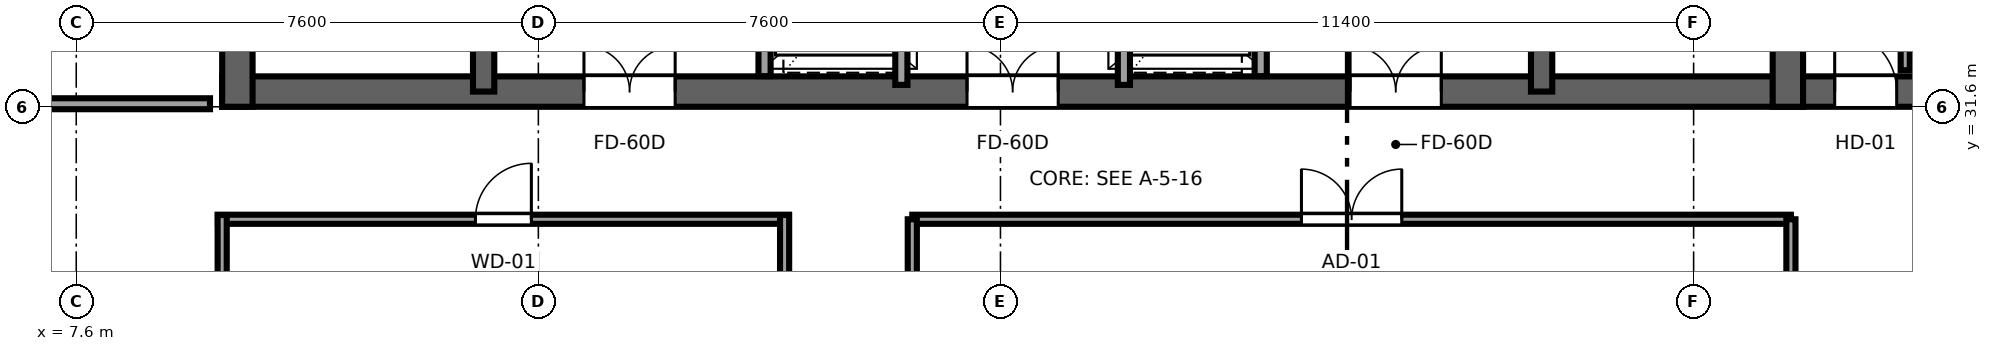
"""IFC4 building model, lengths in metres.
Left out: names, types, materials, properties, quantities, classifications, styles, units other than length and angle.
Written with IfcOpenShell. Run it as: python <this file> out.ifc"""

import sys

from ifc_helpers import new_model, si_unit, direction, frame, frame_2d, origin, place, context, subcontext, project, spatial, rectangle, extrude, source, transform, mapped, element, fill, save


model = new_model("IFC4")
c1 = context("Model", 3, precision=1e-05, world=origin(), true_north=direction((0.0, 1.0)))
c2 = subcontext(c1, "Body", "Model", "MODEL_VIEW")
j1 = project(units=[si_unit("LENGTHUNIT", "METRE"), si_unit("PLANEANGLEUNIT", "RADIAN")], contexts=[c1])
p1 = place(None, origin())
s1 = spatial("IfcSite", under=j1, at=p1, CompositionType="ELEMENT")
p2 = place(p1, origin())
s2 = spatial("IfcBuilding", under=s1, at=p2, CompositionType="ELEMENT")
p3 = place(p2, frame((0.0, 0.0, 227.45)))
s3 = spatial("IfcBuildingStorey", under=s2, at=p3, CompositionType="ELEMENT", Elevation=227.45)
p4 = place(p3, frame((10.0, 31.85, 0.0), z_axis=(0.0, 0.0, 1.0), x_axis=(1.0, 0.0, 0.0)))
e1 = element("IfcWall", 1, at=p4, inside=s3, PredefinedType="SHEAR", context=c2, shape_type="SweptSolid", body=[
    extrude(rectangle(XDim=26.0, YDim=0.5, at=frame_2d((13.0, 0.0))), origin(), (0.0, 0.0, 1.0), 3.55),
])
p5 = place(p4, frame((7.45, 0.0, 0.0), z_axis=(0.0, 0.0, 1.0), x_axis=(-1.0, 0.0, 0.0)))
e2 = element("IfcOpeningElement", 2, at=p5, cuts=e1, PredefinedType="OPENING", context=c2, shape_type="SweptSolid", body=[
    extrude(rectangle(XDim=1.5, YDim=2.04, at=frame_2d((0.75, 1.02))), frame((0.0, 0.26, 0.0), z_axis=(0.0, -1.0, 0.0), x_axis=(1.0, 0.0, 0.0)), (0.0, 0.0, 1.0), 0.52),
])
p6 = place(p4, frame((13.75, 0.0, 0.0), z_axis=(0.0, 0.0, 1.0), x_axis=(-1.0, 0.0, 0.0)))
e3 = element("IfcOpeningElement", 3, at=p6, cuts=e1, PredefinedType="OPENING", context=c2, shape_type="SweptSolid", body=[
    extrude(rectangle(XDim=1.5, YDim=2.04, at=frame_2d((0.75, 1.02))), frame((0.0, 0.26, 0.0), z_axis=(0.0, -1.0, 0.0), x_axis=(1.0, 0.0, 0.0)), (0.0, 0.0, 1.0), 0.52),
])
p7 = place(p4, frame((20.05, 0.0, 0.0), z_axis=(0.0, 0.0, 1.0), x_axis=(-1.0, 0.0, 0.0)))
e4 = element("IfcOpeningElement", 4, at=p7, cuts=e1, PredefinedType="OPENING", context=c2, shape_type="SweptSolid", body=[
    extrude(rectangle(XDim=1.5, YDim=2.04, at=frame_2d((0.75, 1.02))), frame((0.0, 0.26, 0.0), z_axis=(0.0, -1.0, 0.0), x_axis=(1.0, 0.0, 0.0)), (0.0, 0.0, 1.0), 0.52),
])
for number, where, z_axis, x_axis in (
    (5, (10.25, 31.6, 0.0), (0.0, 0.0, 1.0), (0.0, 1.0, 0.0)),
    (6, (35.75, 31.6, 0.0), (0.0, 0.0, 1.0), (0.0, 1.0, 0.0)),
):
    element("IfcWall", number, at=place(p3, frame(where, z_axis=z_axis, x_axis=x_axis)), inside=s3, PredefinedType="SHEAR", context=c2, shape_type="SweptSolid", body=[
        extrude(rectangle(XDim=13.6, YDim=0.5, at=frame_2d((6.8, 0.0))), origin(), (0.0, 0.0, 1.0), 3.55),
    ])
p8 = place(p3, frame((14.3, 31.85, 0.0), z_axis=(0.0, 0.0, 1.0), x_axis=(0.0, 1.0, 0.0)))
e7 = element("IfcWall", 7, at=p8, inside=s3, PredefinedType="SHEAR", context=c2, shape_type="SweptSolid", body=[
    extrude(rectangle(XDim=13.1, YDim=0.35, at=frame_2d((6.55, 0.0))), origin(), (0.0, 0.0, 1.0), 3.55),
])
p9 = place(p8, frame((0.7, 0.0, 0.0)))
e8 = element("IfcOpeningElement", 8, at=p9, cuts=e7, PredefinedType="OPENING", context=c2, shape_type="SweptSolid", body=[
    extrude(rectangle(XDim=1.1, YDim=2.12, at=frame_2d((0.55, 1.06))), frame((0.0, 0.185, 0.0), z_axis=(0.0, -1.0, 0.0), x_axis=(1.0, 0.0, 0.0)), (0.0, 0.0, 1.0), 0.37),
])
p10 = place(p3, frame((31.7, 31.85, 0.0), z_axis=(0.0, 0.0, 1.0), x_axis=(0.0, 1.0, 0.0)))
e9 = element("IfcWall", 9, at=p10, inside=s3, PredefinedType="SHEAR", context=c2, shape_type="SweptSolid", body=[
    extrude(rectangle(XDim=13.1, YDim=0.35, at=frame_2d((6.55, 0.0))), origin(), (0.0, 0.0, 1.0), 3.55),
])
p11 = place(p10, frame((1.8, 0.0, 0.0), z_axis=(0.0, 0.0, 1.0), x_axis=(-1.0, 0.0, 0.0)))
e10 = element("IfcOpeningElement", 10, at=p11, cuts=e9, PredefinedType="OPENING", context=c2, shape_type="SweptSolid", body=[
    extrude(rectangle(XDim=1.1, YDim=2.12, at=frame_2d((0.55, 1.06))), frame((0.0, 0.185, 0.0), z_axis=(0.0, -1.0, 0.0), x_axis=(1.0, 0.0, 0.0)), (0.0, 0.0, 1.0), 0.37),
])
p12 = place(p3, frame((36.0, 31.85, 0.0), z_axis=(0.0, 0.0, 1.0), x_axis=(1.0, 0.0, 0.0)))
e11 = element("IfcWall", 11, at=p12, inside=s3, PredefinedType="SHEAR", context=c2, shape_type="SweptSolid", body=[
    extrude(rectangle(XDim=3.8, YDim=0.5, at=frame_2d((1.9, 0.0))), origin(), (0.0, 0.0, 1.0), 3.55),
])
p13 = place(p12, frame((1.54, 0.0, 0.0), z_axis=(0.0, 0.0, 1.0), x_axis=(-1.0, 0.0, 0.0)))
e12 = element("IfcOpeningElement", 12, at=p13, cuts=e11, PredefinedType="OPENING", context=c2, shape_type="SweptSolid", body=[
    extrude(rectangle(XDim=1.02, YDim=2.03, at=frame_2d((0.51, 1.015))), frame((0.0, 0.26, 0.0), z_axis=(0.0, -1.0, 0.0), x_axis=(1.0, 0.0, 0.0)), (0.0, 0.0, 1.0), 0.52),
])
for number, where, z_axis, x_axis in (
    (13, (18.92, 32.104, 0.0), (0.0, 0.0, 1.0), (0.0, 1.0, 0.0)),
    (14, (27.08, 32.104, 0.0), (0.0, 0.0, 1.0), (0.0, 1.0, 0.0)),
):
    element("IfcWall", number, at=place(p3, frame(where, z_axis=z_axis, x_axis=x_axis)), inside=s3, PredefinedType="SOLIDWALL", context=c2, shape_type="SweptSolid", body=[
        extrude(rectangle(XDim=4.046, YDim=0.2, at=frame_2d((2.023, 0.0))), origin(), (0.0, 0.0, 1.0), 3.37),
    ])
p14 = place(p3, frame((21.17, 31.96, 0.0), z_axis=(0.0, 0.0, 1.0), x_axis=(0.0, 1.0, 0.0)))
e15 = element("IfcWall", 15, at=p14, inside=s3, PredefinedType="SOLIDWALL", context=c2, shape_type="SweptSolid", body=[
    extrude(rectangle(XDim=5.08, YDim=0.2, at=frame_2d((2.54, 0.0))), origin(), (0.0, 0.0, 1.0), 3.37),
])
p15 = place(p14, frame((0.74, 0.0, 0.0)))
e16 = element("IfcOpeningElement", 16, at=p15, cuts=e15, PredefinedType="OPENING", context=c2, shape_type="SweptSolid", body=[
    extrude(rectangle(XDim=1.1, YDim=2.12, at=frame_2d((0.55, 1.06))), frame((0.0, 0.11, 0.0), z_axis=(0.0, -1.0, 0.0), x_axis=(1.0, 0.0, 0.0)), (0.0, 0.0, 1.0), 0.22),
])
p16 = place(p14, frame((3.24, 0.0, 0.0)))
e17 = element("IfcOpeningElement", 17, at=p16, cuts=e15, PredefinedType="OPENING", context=c2, shape_type="SweptSolid", body=[
    extrude(rectangle(XDim=1.1, YDim=2.12, at=frame_2d((0.55, 1.06))), frame((0.0, 0.11, 0.0), z_axis=(0.0, -1.0, 0.0), x_axis=(1.0, 0.0, 0.0)), (0.0, 0.0, 1.0), 0.22),
])
p17 = place(p3, frame((24.83, 31.96, 0.0), z_axis=(0.0, 0.0, 1.0), x_axis=(0.0, 1.0, 0.0)))
e18 = element("IfcWall", 18, at=p17, inside=s3, PredefinedType="SOLIDWALL", context=c2, shape_type="SweptSolid", body=[
    extrude(rectangle(XDim=5.08, YDim=0.2, at=frame_2d((2.54, 0.0))), origin(), (0.0, 0.0, 1.0), 3.37),
])
p18 = place(p17, frame((0.74, 0.0, 0.0)))
e19 = element("IfcOpeningElement", 19, at=p18, cuts=e18, PredefinedType="OPENING", context=c2, shape_type="SweptSolid", body=[
    extrude(rectangle(XDim=1.1, YDim=2.12, at=frame_2d((0.55, 1.06))), frame((0.0, 0.11, 0.0), z_axis=(0.0, -1.0, 0.0), x_axis=(1.0, 0.0, 0.0)), (0.0, 0.0, 1.0), 0.22),
])
p19 = place(p17, frame((3.24, 0.0, 0.0)))
e20 = element("IfcOpeningElement", 20, at=p19, cuts=e18, PredefinedType="OPENING", context=c2, shape_type="SweptSolid", body=[
    extrude(rectangle(XDim=1.1, YDim=2.12, at=frame_2d((0.55, 1.06))), frame((0.0, 0.11, 0.0), z_axis=(0.0, -1.0, 0.0), x_axis=(1.0, 0.0, 0.0)), (0.0, 0.0, 1.0), 0.22),
])
p20 = place(p3, frame((37.68, 32.2, 0.0), z_axis=(0.0, 0.0, 1.0), x_axis=(0.0, 1.0, 0.0)))
e21 = element("IfcWall", 21, at=p20, inside=s3, PredefinedType="PARTITIONING", context=c2, shape_type="SweptSolid", body=[
    extrude(rectangle(XDim=6.0, YDim=0.15, at=frame_2d((3.0, 0.0))), origin(), (0.0, 0.0, 1.0), 3.37),
])
p21 = place(p20, frame((2.49, 0.0, 0.0)))
e22 = element("IfcOpeningElement", 22, at=p21, cuts=e21, PredefinedType="OPENING", context=c2, shape_type="SweptSolid", body=[
    extrude(rectangle(XDim=1.02, YDim=2.03, at=frame_2d((0.51, 1.015))), frame((0.0, 0.085, 0.0), z_axis=(0.0, -1.0, 0.0), x_axis=(1.0, 0.0, 0.0)), (0.0, 0.0, 1.0), 0.17),
])
p22 = place(p3, frame((2.9, 31.65, 0.0), z_axis=(0.0, 0.0, 1.0), x_axis=(1.0, 0.0, 0.0)))
e23 = element("IfcWall", 23, at=p22, inside=s3, PredefinedType="PARTITIONING", context=c2, shape_type="SweptSolid", body=[
    extrude(rectangle(XDim=6.9, YDim=0.18, at=frame_2d((3.45, 0.0))), origin(), (0.0, 0.0, 1.0), 3.37),
])
p23 = place(p22, frame((2.625, 0.0, 0.0)))
e24 = element("IfcOpeningElement", 24, at=p23, cuts=e23, PredefinedType="OPENING", context=c2, shape_type="SweptSolid", body=[
    extrude(rectangle(XDim=1.65, YDim=2.15, at=frame_2d((0.825, 1.075))), frame((0.0, 0.1, 0.0), z_axis=(0.0, -1.0, 0.0), x_axis=(1.0, 0.0, 0.0)), (0.0, 0.0, 1.0), 0.2),
])
p24 = place(p3, frame((9.93, 29.75, 0.0), z_axis=(0.0, 0.0, 1.0), x_axis=(1.0, 0.0, 0.0)))
e25 = element("IfcWall", 25, at=p24, inside=s3, PredefinedType="PARTITIONING", context=c2, shape_type="SweptSolid", body=[
    extrude(rectangle(XDim=9.39, YDim=0.15, at=frame_2d((4.695, 0.0))), origin(), (0.0, 0.0, 1.0), 3.37),
])
p25 = place(p24, frame((4.235, 0.0, 0.0)))
e26 = element("IfcOpeningElement", 26, at=p25, cuts=e25, PredefinedType="OPENING", context=c2, shape_type="SweptSolid", body=[
    extrude(rectangle(XDim=0.92, YDim=2.01, at=frame_2d((0.46, 1.005))), frame((0.0, 0.085, 0.0), z_axis=(0.0, -1.0, 0.0), x_axis=(1.0, 0.0, 0.0)), (0.0, 0.0, 1.0), 0.17),
])
for number, where, z_axis, x_axis in (
    (27, (10.0, 27.03, 0.0), (0.0, 0.0, 1.0), (0.0, 1.0, 0.0)),
    (28, (19.25, 27.03, 0.0), (0.0, 0.0, 1.0), (0.0, 1.0, 0.0)),
):
    element("IfcWall", number, at=place(p3, frame(where, z_axis=z_axis, x_axis=x_axis)), inside=s3, PredefinedType="PARTITIONING", context=c2, shape_type="SweptSolid", body=[
        extrude(rectangle(XDim=2.79, YDim=0.15, at=frame_2d((1.395, 0.0))), origin(), (0.0, 0.0, 1.0), 3.37),
    ])
p26 = place(p3, frame((21.35, 29.75, 0.0), z_axis=(0.0, 0.0, 1.0), x_axis=(1.0, 0.0, 0.0)))
e29 = element("IfcWall", 29, at=p26, inside=s3, PredefinedType="PARTITIONING", context=c2, shape_type="SweptSolid", body=[
    extrude(rectangle(XDim=14.45, YDim=0.15, at=frame_2d((7.225, 0.0))), origin(), (0.0, 0.0, 1.0), 3.37),
])
p27 = place(p26, frame((6.4, 0.0, 0.0)))
e30 = element("IfcOpeningElement", 30, at=p27, cuts=e29, PredefinedType="OPENING", context=c2, shape_type="SweptSolid", body=[
    extrude(rectangle(XDim=1.65, YDim=2.15, at=frame_2d((0.825, 1.075))), frame((0.0, 0.085, 0.0), z_axis=(0.0, -1.0, 0.0), x_axis=(1.0, 0.0, 0.0)), (0.0, 0.0, 1.0), 0.17),
])
for number, where, z_axis, x_axis in (
    (31, (21.35, 25.0, 0.0), (0.0, 0.0, 1.0), (0.0, 1.0, 0.0)),
    (32, (35.8, 25.0, 0.0), (0.0, 0.0, 1.0), (0.0, 1.0, 0.0)),
):
    element("IfcWall", number, at=place(p3, frame(where, z_axis=z_axis, x_axis=x_axis)), inside=s3, PredefinedType="PARTITIONING", context=c2, shape_type="SweptSolid", body=[
        extrude(rectangle(XDim=4.75, YDim=0.15, at=frame_2d((2.375, 0.0))), origin(), (0.0, 0.0, 1.0), 3.37),
    ])
m1 = source(origin(), c2, "Body", "SweptSolid", [
    extrude(rectangle(XDim=1.5, YDim=2.04, at=frame_2d((0.75, 1.02))), frame((0.0, 0.025, 0.0), z_axis=(0.0, -1.0, 0.0), x_axis=(1.0, 0.0, 0.0)), (0.0, 0.0, 1.0), 0.05),
])
p28 = place(p5, origin())
e33 = element("IfcDoor", 33, at=p28, inside=s3, OperationType="DOUBLE_DOOR_SINGLE_SWING", PredefinedType="DOOR", context=c2, shape_type="MappedRepresentation", body=[
    mapped(m1, transform((0.0, 0.0, 0.0), x_axis=(1.0, 0.0, 0.0), y_axis=(0.0, 1.0, 0.0), z_axis=(0.0, 0.0, 1.0), scale=1.0)),
])
fill(e2, e33)
p29 = place(p6, origin())
e34 = element("IfcDoor", 34, at=p29, inside=s3, OperationType="DOUBLE_DOOR_SINGLE_SWING", PredefinedType="DOOR", context=c2, shape_type="MappedRepresentation", body=[
    mapped(m1, transform((0.0, 0.0, 0.0), x_axis=(1.0, 0.0, 0.0), y_axis=(0.0, 1.0, 0.0), z_axis=(0.0, 0.0, 1.0), scale=1.0)),
])
fill(e3, e34)
p30 = place(p7, origin())
e35 = element("IfcDoor", 35, at=p30, inside=s3, OperationType="DOUBLE_DOOR_SINGLE_SWING", PredefinedType="DOOR", context=c2, shape_type="MappedRepresentation", body=[
    mapped(m1, transform((0.0, 0.0, 0.0), x_axis=(1.0, 0.0, 0.0), y_axis=(0.0, 1.0, 0.0), z_axis=(0.0, 0.0, 1.0), scale=1.0)),
])
fill(e4, e35)
m2 = source(origin(), c2, "Body", "SweptSolid", [
    extrude(rectangle(XDim=1.02, YDim=2.03, at=frame_2d((0.51, 1.015))), frame((0.0, 0.025, 0.0), z_axis=(0.0, -1.0, 0.0), x_axis=(1.0, 0.0, 0.0)), (0.0, 0.0, 1.0), 0.05),
])
p31 = place(p13, origin())
e36 = element("IfcDoor", 36, at=p31, inside=s3, OperationType="SINGLE_SWING_LEFT", PredefinedType="DOOR", context=c2, shape_type="MappedRepresentation", body=[
    mapped(m2, transform((0.0, 0.0, 0.0), x_axis=(1.0, 0.0, 0.0), y_axis=(0.0, 1.0, 0.0), z_axis=(0.0, 0.0, 1.0), scale=1.0)),
])
fill(e12, e36)
m3 = source(origin(), c2, "Body", "SweptSolid", [
    extrude(rectangle(XDim=0.92, YDim=2.01, at=frame_2d((0.46, 1.005))), frame((0.0, 0.025, 0.0), z_axis=(0.0, -1.0, 0.0), x_axis=(1.0, 0.0, 0.0)), (0.0, 0.0, 1.0), 0.05),
])
p32 = place(p25, origin())
e37 = element("IfcDoor", 37, at=p32, inside=s3, OperationType="SINGLE_SWING_RIGHT", PredefinedType="DOOR", context=c2, shape_type="MappedRepresentation", body=[
    mapped(m3, transform((0.0, 0.0, 0.0), x_axis=(1.0, 0.0, 0.0), y_axis=(0.0, 1.0, 0.0), z_axis=(0.0, 0.0, 1.0), scale=1.0)),
])
fill(e26, e37)
m4 = source(origin(), c2, "Body", "SweptSolid", [
    extrude(rectangle(XDim=1.65, YDim=2.15, at=frame_2d((0.825, 1.075))), frame((0.0, 0.025, 0.0), z_axis=(0.0, -1.0, 0.0), x_axis=(1.0, 0.0, 0.0)), (0.0, 0.0, 1.0), 0.05),
])
p33 = place(p27, origin())
e38 = element("IfcDoor", 38, at=p33, inside=s3, OperationType="DOUBLE_DOOR_SINGLE_SWING", PredefinedType="DOOR", context=c2, shape_type="MappedRepresentation", body=[
    mapped(m4, transform((0.0, 0.0, 0.0), x_axis=(1.0, 0.0, 0.0), y_axis=(0.0, 1.0, 0.0), z_axis=(0.0, 0.0, 1.0), scale=1.0)),
])
fill(e30, e38)
save(model, sys.argv[1])
